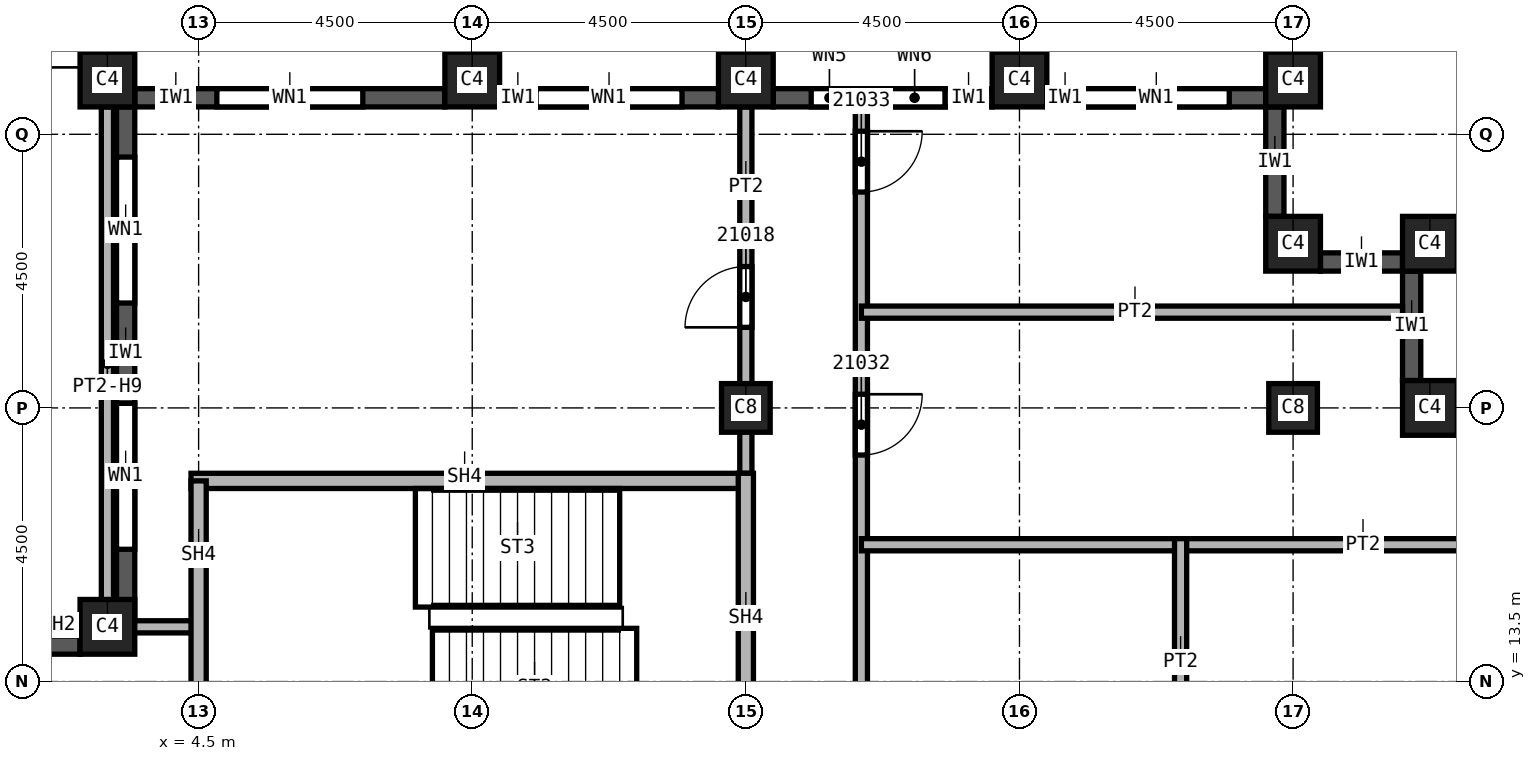
"""IFC4 building model, lengths in metres.
Left out: names, types, materials, properties, quantities, classifications, styles, units other than length and angle.
Written with IfcOpenShell. Run it as: python <this file> out.ifc"""

import sys

from ifc_helpers import new_model, si_unit, direction, frame, frame_2d, origin, origin_2d, place, context, subcontext, project, spatial, rectangle, extrude, element, fill, save


model = new_model("IFC4")
c1 = context("Model", 3, precision=1e-05, world=origin(), true_north=direction((0.0, 1.0)))
c2 = subcontext(c1, "Body", "Model", "MODEL_VIEW")
j1 = project(units=[si_unit("LENGTHUNIT", "METRE"), si_unit("PLANEANGLEUNIT", "RADIAN")], contexts=[c1])
p1 = place(None, origin())
s1 = spatial("IfcSite", under=j1, at=p1, CompositionType="ELEMENT")
p2 = place(p1, origin())
s2 = spatial("IfcBuilding", under=s1, at=p2, CompositionType="ELEMENT")
p3 = place(p2, frame((0.0, 0.0, 300.0)))
s3 = spatial("IfcBuildingStorey", under=s2, at=p3, CompositionType="ELEMENT", Elevation=300.0)
for number, where, z_axis, x_axis in (
    (1, (13.5, 18.0, 0.0), (0.0, 0.0, 1.0), (1.0, 0.0, 0.0)),
    (2, (22.5, 18.0, 0.0), (0.0, 0.0, 1.0), (1.0, 0.0, 0.0)),
):
    element("IfcColumn", number, at=place(p3, frame(where, z_axis=z_axis, x_axis=x_axis)), inside=s3, PredefinedType="COLUMN", context=c2, shape_type="SweptSolid", body=[
        extrude(rectangle(XDim=0.8, YDim=0.8, at=origin_2d()), origin(), (0.0, 0.0, 1.0), 3.74),
    ])
for number, where, z_axis, x_axis in (
    (3, (3.0, 23.4, 0.0), (0.0, 0.0, 1.0), (1.0, 0.0, 0.0)),
    (4, (9.0, 23.4, 0.0), (0.0, 0.0, 1.0), (1.0, 0.0, 0.0)),
    (5, (13.5, 23.4, 0.0), (0.0, 0.0, 1.0), (1.0, 0.0, 0.0)),
    (6, (18.0, 23.4, 0.0), (0.0, 0.0, 1.0), (1.0, 0.0, 0.0)),
    (7, (22.5, 23.4, 0.0), (0.0, 0.0, 1.0), (1.0, 0.0, 0.0)),
    (8, (3.0, 14.4, 0.0), (0.0, 0.0, 1.0), (1.0, 0.0, 0.0)),
    (9, (22.5, 20.7, 0.0), (0.0, 0.0, 1.0), (1.0, 0.0, 0.0)),
    (10, (24.75, 20.7, 0.0), (0.0, 0.0, 1.0), (1.0, 0.0, 0.0)),
    (11, (24.75, 18.0, 0.0), (0.0, 0.0, 1.0), (1.0, 0.0, 0.0)),
):
    element("IfcColumn", number, at=place(p3, frame(where, z_axis=z_axis, x_axis=x_axis)), inside=s3, PredefinedType="COLUMN", context=c2, shape_type="SweptSolid", body=[
        extrude(rectangle(XDim=0.9, YDim=0.9, at=origin_2d()), origin(), (0.0, 0.0, 1.0), 3.74),
    ])
p4 = place(p3, frame((24.45, 18.45, 0.0), z_axis=(0.0, 0.0, 1.0), x_axis=(0.0, 1.0, 0.0)))
e12 = element("IfcWall", 12, at=p4, inside=s3, PredefinedType="SOLIDWALL", context=c2, shape_type="SweptSolid", body=[
    extrude(rectangle(XDim=1.8, YDim=0.3, at=frame_2d((0.9, 0.0))), origin(), (0.0, 0.0, 1.0), 3.14),
])
p5 = place(p3, frame((24.3, 20.4, 0.0), z_axis=(0.0, 0.0, 1.0), x_axis=(-1.0, 0.0, 0.0)))
e13 = element("IfcWall", 13, at=p5, inside=s3, PredefinedType="SOLIDWALL", context=c2, shape_type="SweptSolid", body=[
    extrude(rectangle(XDim=1.35, YDim=0.3, at=frame_2d((0.675, 0.0))), origin(), (0.0, 0.0, 1.0), 3.14),
])
p6 = place(p3, frame((22.2, 21.15, 0.0), z_axis=(0.0, 0.0, 1.0), x_axis=(0.0, 1.0, 0.0)))
e14 = element("IfcWall", 14, at=p6, inside=s3, PredefinedType="SOLIDWALL", context=c2, shape_type="SweptSolid", body=[
    extrude(rectangle(XDim=1.8, YDim=0.3, at=frame_2d((0.9, 0.0))), origin(), (0.0, 0.0, 1.0), 3.14),
])
p7 = place(p3, frame((22.05, 23.1, 0.0), z_axis=(0.0, 0.0, 1.0), x_axis=(-1.0, 0.0, 0.0)))
e15 = element("IfcWall", 15, at=p7, inside=s3, PredefinedType="SOLIDWALL", context=c2, shape_type="SweptSolid", body=[
    extrude(rectangle(XDim=3.6, YDim=0.3, at=frame_2d((1.8, 0.0))), origin(), (0.0, 0.0, 1.0), 3.14),
])
p8 = place(p7, frame((0.6, 0.0, 0.8)))
e16 = element("IfcOpeningElement", 16, at=p8, cuts=e15, PredefinedType="OPENING", context=c2, shape_type="SweptSolid", body=[
    extrude(rectangle(XDim=2.4, YDim=1.95, at=frame_2d((1.2, 0.975))), frame((0.0, 0.15, 0.0), z_axis=(0.0, -1.0, 0.0), x_axis=(1.0, 0.0, 0.0)), (0.0, 0.0, 1.0), 0.3),
])
p9 = place(p3, frame((17.55, 23.1, 0.0), z_axis=(0.0, 0.0, 1.0), x_axis=(-1.0, 0.0, 0.0)))
e17 = element("IfcWall", 17, at=p9, inside=s3, PredefinedType="SOLIDWALL", context=c2, shape_type="SweptSolid", body=[
    extrude(rectangle(XDim=3.6, YDim=0.3, at=frame_2d((1.8, 0.0))), origin(), (0.0, 0.0, 1.0), 3.14),
])
p10 = place(p9, frame((0.775, 0.0, 0.8)))
e18 = element("IfcOpeningElement", 18, at=p10, cuts=e17, PredefinedType="OPENING", context=c2, shape_type="SweptSolid", body=[
    extrude(rectangle(XDim=1.0, YDim=1.95, at=frame_2d((0.5, 0.975))), frame((0.0, 0.15, 0.0), z_axis=(0.0, -1.0, 0.0), x_axis=(1.0, 0.0, 0.0)), (0.0, 0.0, 1.0), 0.3),
])
p11 = place(p9, frame((2.375, 0.0, 0.8)))
e19 = element("IfcOpeningElement", 19, at=p11, cuts=e17, PredefinedType="OPENING", context=c2, shape_type="SweptSolid", body=[
    extrude(rectangle(XDim=0.6, YDim=1.95, at=frame_2d((0.3, 0.975))), frame((0.0, 0.15, 0.0), z_axis=(0.0, -1.0, 0.0), x_axis=(1.0, 0.0, 0.0)), (0.0, 0.0, 1.0), 0.3),
])
p12 = place(p3, frame((13.05, 23.1, 0.0), z_axis=(0.0, 0.0, 1.0), x_axis=(-1.0, 0.0, 0.0)))
e20 = element("IfcWall", 20, at=p12, inside=s3, PredefinedType="SOLIDWALL", context=c2, shape_type="SweptSolid", body=[
    extrude(rectangle(XDim=3.6, YDim=0.3, at=frame_2d((1.8, 0.0))), origin(), (0.0, 0.0, 1.0), 3.14),
])
p13 = place(p12, frame((0.6, 0.0, 0.8)))
e21 = element("IfcOpeningElement", 21, at=p13, cuts=e20, PredefinedType="OPENING", context=c2, shape_type="SweptSolid", body=[
    extrude(rectangle(XDim=2.4, YDim=1.95, at=frame_2d((1.2, 0.975))), frame((0.0, 0.15, 0.0), z_axis=(0.0, -1.0, 0.0), x_axis=(1.0, 0.0, 0.0)), (0.0, 0.0, 1.0), 0.3),
])
p14 = place(p3, frame((8.55, 23.1, 0.0), z_axis=(0.0, 0.0, 1.0), x_axis=(-1.0, 0.0, 0.0)))
e22 = element("IfcWall", 22, at=p14, inside=s3, PredefinedType="SOLIDWALL", context=c2, shape_type="SweptSolid", body=[
    extrude(rectangle(XDim=5.1, YDim=0.3, at=frame_2d((2.55, 0.0))), origin(), (0.0, 0.0, 1.0), 3.14),
])
p15 = place(p14, frame((1.35, 0.0, 0.8)))
e23 = element("IfcOpeningElement", 23, at=p15, cuts=e22, PredefinedType="OPENING", context=c2, shape_type="SweptSolid", body=[
    extrude(rectangle(XDim=2.4, YDim=1.95, at=frame_2d((1.2, 0.975))), frame((0.0, 0.15, 0.0), z_axis=(0.0, -1.0, 0.0), x_axis=(1.0, 0.0, 0.0)), (0.0, 0.0, 1.0), 0.3),
])
p16 = place(p3, frame((3.3, 22.95, 0.0), z_axis=(0.0, 0.0, 1.0), x_axis=(0.0, -1.0, 0.0)))
e24 = element("IfcWall", 24, at=p16, inside=s3, PredefinedType="SOLIDWALL", context=c2, shape_type="SweptSolid", body=[
    extrude(rectangle(XDim=8.5, YDim=0.3, at=frame_2d((4.25, 0.0))), origin(), (0.0, 0.0, 1.0), 3.14),
])
p17 = place(p16, frame((0.825, 0.0, 0.8)))
e25 = element("IfcOpeningElement", 25, at=p17, cuts=e24, PredefinedType="OPENING", context=c2, shape_type="SweptSolid", body=[
    extrude(rectangle(XDim=2.4, YDim=1.95, at=frame_2d((1.2, 0.975))), frame((0.0, 0.15, 0.0), z_axis=(0.0, -1.0, 0.0), x_axis=(1.0, 0.0, 0.0)), (0.0, 0.0, 1.0), 0.3),
])
p18 = place(p16, frame((4.875, 0.0, 0.8)))
e26 = element("IfcOpeningElement", 26, at=p18, cuts=e24, PredefinedType="OPENING", context=c2, shape_type="SweptSolid", body=[
    extrude(rectangle(XDim=2.4, YDim=1.95, at=frame_2d((1.2, 0.975))), frame((0.0, 0.15, 0.0), z_axis=(0.0, -1.0, 0.0), x_axis=(1.0, 0.0, 0.0)), (0.0, 0.0, 1.0), 0.3),
])
p19 = place(p3, frame((-2.55, 14.1, 0.0), z_axis=(0.0, 0.0, 1.0), x_axis=(1.0, 0.0, 0.0)))
e27 = element("IfcWall", 27, at=p19, inside=s3, PredefinedType="SOLIDWALL", context=c2, shape_type="SweptSolid", body=[
    extrude(rectangle(XDim=5.1, YDim=0.3, at=frame_2d((2.55, 0.0))), origin(), (0.0, 0.0, 1.0), 3.14),
])
p20 = place(p19, frame((1.95, 0.0, 0.0)))
e28 = element("IfcOpeningElement", 28, at=p20, cuts=e27, PredefinedType="OPENING", context=c2, shape_type="SweptSolid", body=[
    extrude(rectangle(XDim=1.2, YDim=2.4, at=frame_2d((0.6, 1.2))), frame((0.0, 0.15, 0.0), z_axis=(0.0, -1.0, 0.0), x_axis=(1.0, 0.0, 0.0)), (0.0, 0.0, 1.0), 0.3),
])
p21 = place(p3, frame((0.9, 14.4, 0.0), z_axis=(0.0, 0.0, 1.0), x_axis=(1.0, 0.0, 0.0)))
e29 = element("IfcWall", 29, at=p21, inside=s3, PredefinedType="PARTITIONING", context=c2, shape_type="SweptSolid", body=[
    extrude(rectangle(XDim=3.6, YDim=0.2, at=frame_2d((1.8, 0.0))), origin(), (0.0, 0.0, 1.0), 3.207),
])
p22 = place(p3, frame((3.0, 22.95, 0.0), z_axis=(0.0, 0.0, 1.0), x_axis=(0.0, -1.0, 0.0)))
e30 = element("IfcWall", 30, at=p22, inside=s3, PredefinedType="PARTITIONING", context=c2, shape_type="SweptSolid", body=[
    extrude(rectangle(XDim=8.55, YDim=0.2, at=frame_2d((4.275, 0.0))), origin(), (0.0, 0.0, 1.0), 2.894),
])
p23 = place(p3, frame((13.5, 16.675, 0.0), z_axis=(0.0, 0.0, 1.0), x_axis=(0.0, 1.0, 0.0)))
e31 = element("IfcWall", 31, at=p23, inside=s3, PredefinedType="PARTITIONING", context=c2, shape_type="SweptSolid", body=[
    extrude(rectangle(XDim=6.275, YDim=0.2, at=frame_2d((3.137, 0.0))), origin(), (0.0, 0.0, 1.0), 3.74),
])
p24 = place(p23, frame((2.65, 0.0, 0.0)))
e32 = element("IfcOpeningElement", 32, at=p24, cuts=e31, PredefinedType="OPENING", context=c2, shape_type="SweptSolid", body=[
    extrude(rectangle(XDim=1.0, YDim=2.1, at=frame_2d((0.5, 1.05))), frame((0.0, 0.1, 0.0), z_axis=(0.0, -1.0, 0.0), x_axis=(1.0, 0.0, 0.0)), (0.0, 0.0, 1.0), 0.2),
])
p25 = place(p3, frame((15.4, 22.95, 0.0), z_axis=(0.0, 0.0, 1.0), x_axis=(0.0, -1.0, 0.0)))
e33 = element("IfcWall", 33, at=p25, inside=s3, PredefinedType="PARTITIONING", context=c2, shape_type="SweptSolid", body=[
    extrude(rectangle(XDim=45.9, YDim=0.2, at=frame_2d((22.95, 0.0))), origin(), (0.0, 0.0, 1.0), 3.74),
])
p26 = place(p25, frame((20.7, 0.0, 0.0)))
e34 = element("IfcOpeningElement", 34, at=p26, cuts=e33, PredefinedType="OPENING", context=c2, shape_type="SweptSolid", body=[
    extrude(rectangle(XDim=1.0, YDim=2.1, at=frame_2d((0.5, 1.05))), frame((0.0, 0.1, 0.0), z_axis=(0.0, -1.0, 0.0), x_axis=(1.0, 0.0, 0.0)), (0.0, 0.0, 1.0), 0.2),
])
p27 = place(p25, frame((11.85, 0.0, 0.0)))
e35 = element("IfcOpeningElement", 35, at=p27, cuts=e33, PredefinedType="OPENING", context=c2, shape_type="SweptSolid", body=[
    extrude(rectangle(XDim=1.0, YDim=2.1, at=frame_2d((0.5, 1.05))), frame((0.0, 0.1, 0.0), z_axis=(0.0, -1.0, 0.0), x_axis=(1.0, 0.0, 0.0)), (0.0, 0.0, 1.0), 0.2),
])
p28 = place(p25, frame((4.725, 0.0, 0.0)))
e36 = element("IfcOpeningElement", 36, at=p28, cuts=e33, PredefinedType="OPENING", context=c2, shape_type="SweptSolid", body=[
    extrude(rectangle(XDim=1.0, YDim=2.1, at=frame_2d((0.5, 1.05))), frame((0.0, 0.1, 0.0), z_axis=(0.0, -1.0, 0.0), x_axis=(1.0, 0.0, 0.0)), (0.0, 0.0, 1.0), 0.2),
])
p29 = place(p25, frame((0.4, 0.0, 0.0)))
e37 = element("IfcOpeningElement", 37, at=p29, cuts=e33, PredefinedType="OPENING", context=c2, shape_type="SweptSolid", body=[
    extrude(rectangle(XDim=1.0, YDim=2.1, at=frame_2d((0.5, 1.05))), frame((0.0, 0.1, 0.0), z_axis=(0.0, -1.0, 0.0), x_axis=(1.0, 0.0, 0.0)), (0.0, 0.0, 1.0), 0.2),
])
p30 = place(p25, frame((38.85, 0.0, 0.0)))
e38 = element("IfcOpeningElement", 38, at=p30, cuts=e33, PredefinedType="OPENING", context=c2, shape_type="SweptSolid", body=[
    extrude(rectangle(XDim=1.0, YDim=2.1, at=frame_2d((0.5, 1.05))), frame((0.0, 0.1, 0.0), z_axis=(0.0, -1.0, 0.0), x_axis=(1.0, 0.0, 0.0)), (0.0, 0.0, 1.0), 0.2),
])
p31 = place(p25, frame((26.55, 0.0, 0.0)))
e39 = element("IfcOpeningElement", 39, at=p31, cuts=e33, PredefinedType="OPENING", context=c2, shape_type="SweptSolid", body=[
    extrude(rectangle(XDim=1.0, YDim=2.1, at=frame_2d((0.5, 1.05))), frame((0.0, 0.1, 0.0), z_axis=(0.0, -1.0, 0.0), x_axis=(1.0, 0.0, 0.0)), (0.0, 0.0, 1.0), 0.2),
])
p32 = place(p3, frame((15.4, 15.75, 0.0), z_axis=(0.0, 0.0, 1.0), x_axis=(1.0, 0.0, 0.0)))
e40 = element("IfcWall", 40, at=p32, inside=s3, PredefinedType="PARTITIONING", context=c2, shape_type="SweptSolid", body=[
    extrude(rectangle(XDim=11.15, YDim=0.2, at=frame_2d((5.575, 0.0))), origin(), (0.0, 0.0, 1.0), 3.74),
])
p33 = place(p3, frame((15.4, 19.575, 0.0), z_axis=(0.0, 0.0, 1.0), x_axis=(1.0, 0.0, 0.0)))
e41 = element("IfcWall", 41, at=p33, inside=s3, PredefinedType="PARTITIONING", context=c2, shape_type="SweptSolid", body=[
    extrude(rectangle(XDim=8.9, YDim=0.2, at=frame_2d((4.45, 0.0))), origin(), (0.0, 0.0, 1.0), 3.74),
])
p34 = place(p3, frame((20.65, 15.85, 0.0), z_axis=(0.0, 0.0, 1.0), x_axis=(0.0, -1.0, 0.0)))
e42 = element("IfcWall", 42, at=p34, inside=s3, PredefinedType="PARTITIONING", context=c2, shape_type="SweptSolid", body=[
    extrude(rectangle(XDim=6.85, YDim=0.2, at=frame_2d((3.425, 0.0))), origin(), (0.0, 0.0, 1.0), 3.74),
])
p35 = place(p34, frame((3.85, 0.0, 0.0)))
e43 = element("IfcOpeningElement", 43, at=p35, cuts=e42, PredefinedType="OPENING", context=c2, shape_type="SweptSolid", body=[
    extrude(rectangle(XDim=1.0, YDim=2.1, at=frame_2d((0.5, 1.05))), frame((0.0, 0.1, 0.0), z_axis=(0.0, -1.0, 0.0), x_axis=(1.0, 0.0, 0.0)), (0.0, 0.0, 1.0), 0.2),
])
p36 = place(p3, frame((4.375, 16.8, 0.0), z_axis=(0.0, 0.0, 1.0), x_axis=(1.0, 0.0, 0.0)))
e44 = element("IfcWall", 44, at=p36, inside=s3, PredefinedType="SOLIDWALL", context=c2, shape_type="SweptSolid", body=[
    extrude(rectangle(XDim=9.125, YDim=0.25, at=frame_2d((4.562, 0.0))), origin(), (0.0, 0.0, 1.0), 3.74),
])
p37 = place(p3, frame((4.5, 12.3, 0.0), z_axis=(0.0, 0.0, 1.0), x_axis=(0.0, 1.0, 0.0)))
e45 = element("IfcWall", 45, at=p37, inside=s3, PredefinedType="SOLIDWALL", context=c2, shape_type="SweptSolid", body=[
    extrude(rectangle(XDim=4.5, YDim=0.25, at=frame_2d((2.25, 0.0))), origin(), (0.0, 0.0, 1.0), 3.74),
])
p38 = place(p3, frame((13.5, 12.175, 0.0), z_axis=(0.0, 0.0, 1.0), x_axis=(0.0, 1.0, 0.0)))
e46 = element("IfcWall", 46, at=p38, inside=s3, PredefinedType="SOLIDWALL", context=c2, shape_type="SweptSolid", body=[
    extrude(rectangle(XDim=4.75, YDim=0.25, at=frame_2d((2.375, 0.0))), origin(), (0.0, 0.0, 1.0), 3.74),
])
p39 = place(p8, origin())
e47 = element("IfcWindow", 47, at=p39, inside=s3, PartitioningType="SINGLE_PANEL", PredefinedType="WINDOW", context=c2, shape_type="SweptSolid", body=[
    extrude(rectangle(XDim=2.4, YDim=1.95, at=frame_2d((1.2, 0.975))), frame((0.0, 0.03, 0.0), z_axis=(0.0, -1.0, 0.0), x_axis=(1.0, 0.0, 0.0)), (0.0, 0.0, 1.0), 0.06),
])
fill(e16, e47)
p40 = place(p13, origin())
e48 = element("IfcWindow", 48, at=p40, inside=s3, PartitioningType="SINGLE_PANEL", PredefinedType="WINDOW", context=c2, shape_type="SweptSolid", body=[
    extrude(rectangle(XDim=2.4, YDim=1.95, at=frame_2d((1.2, 0.975))), frame((0.0, 0.03, 0.0), z_axis=(0.0, -1.0, 0.0), x_axis=(1.0, 0.0, 0.0)), (0.0, 0.0, 1.0), 0.06),
])
fill(e21, e48)
p41 = place(p15, origin())
e49 = element("IfcWindow", 49, at=p41, inside=s3, PartitioningType="SINGLE_PANEL", PredefinedType="WINDOW", context=c2, shape_type="SweptSolid", body=[
    extrude(rectangle(XDim=2.4, YDim=1.95, at=frame_2d((1.2, 0.975))), frame((0.0, 0.03, 0.0), z_axis=(0.0, -1.0, 0.0), x_axis=(1.0, 0.0, 0.0)), (0.0, 0.0, 1.0), 0.06),
])
fill(e23, e49)
p42 = place(p17, origin())
e50 = element("IfcWindow", 50, at=p42, inside=s3, PartitioningType="SINGLE_PANEL", PredefinedType="WINDOW", context=c2, shape_type="SweptSolid", body=[
    extrude(rectangle(XDim=2.4, YDim=1.95, at=frame_2d((1.2, 0.975))), frame((0.0, 0.03, 0.0), z_axis=(0.0, -1.0, 0.0), x_axis=(1.0, 0.0, 0.0)), (0.0, 0.0, 1.0), 0.06),
])
fill(e25, e50)
p43 = place(p18, origin())
e51 = element("IfcWindow", 51, at=p43, inside=s3, PartitioningType="SINGLE_PANEL", PredefinedType="WINDOW", context=c2, shape_type="SweptSolid", body=[
    extrude(rectangle(XDim=2.4, YDim=1.95, at=frame_2d((1.2, 0.975))), frame((0.0, 0.03, 0.0), z_axis=(0.0, -1.0, 0.0), x_axis=(1.0, 0.0, 0.0)), (0.0, 0.0, 1.0), 0.06),
])
fill(e26, e51)
p44 = place(p24, origin())
e52 = element("IfcDoor", 52, at=p44, inside=s3, OperationType="SINGLE_SWING_LEFT", PredefinedType="DOOR", context=c2, shape_type="SweptSolid", body=[
    extrude(rectangle(XDim=1.0, YDim=2.1, at=frame_2d((0.5, 1.05))), frame((0.0, 0.025, 0.0), z_axis=(0.0, -1.0, 0.0), x_axis=(1.0, 0.0, 0.0)), (0.0, 0.0, 1.0), 0.05),
])
fill(e32, e52)
p45 = place(p28, origin())
e53 = element("IfcDoor", 53, at=p45, inside=s3, OperationType="SINGLE_SWING_LEFT", PredefinedType="DOOR", context=c2, shape_type="SweptSolid", body=[
    extrude(rectangle(XDim=1.0, YDim=2.1, at=frame_2d((0.5, 1.05))), frame((0.0, 0.025, 0.0), z_axis=(0.0, -1.0, 0.0), x_axis=(1.0, 0.0, 0.0)), (0.0, 0.0, 1.0), 0.05),
])
fill(e36, e53)
p46 = place(p29, origin())
e54 = element("IfcDoor", 54, at=p46, inside=s3, OperationType="SINGLE_SWING_RIGHT", PredefinedType="DOOR", context=c2, shape_type="SweptSolid", body=[
    extrude(rectangle(XDim=1.0, YDim=2.1, at=frame_2d((0.5, 1.05))), frame((0.0, 0.025, 0.0), z_axis=(0.0, -1.0, 0.0), x_axis=(1.0, 0.0, 0.0)), (0.0, 0.0, 1.0), 0.05),
])
fill(e37, e54)
p47 = place(p10, origin())
e55 = element("IfcWindow", 55, at=p47, inside=s3, PartitioningType="SINGLE_PANEL", PredefinedType="WINDOW", context=c2, shape_type="SweptSolid", body=[
    extrude(rectangle(XDim=1.0, YDim=1.95, at=frame_2d((0.5, 0.975))), frame((0.0, 0.03, 0.0), z_axis=(0.0, -1.0, 0.0), x_axis=(1.0, 0.0, 0.0)), (0.0, 0.0, 1.0), 0.06),
])
fill(e18, e55)
p48 = place(p11, origin())
e56 = element("IfcWindow", 56, at=p48, inside=s3, PartitioningType="SINGLE_PANEL", PredefinedType="WINDOW", context=c2, shape_type="SweptSolid", body=[
    extrude(rectangle(XDim=0.6, YDim=1.95, at=frame_2d((0.3, 0.975))), frame((0.0, 0.03, 0.0), z_axis=(0.0, -1.0, 0.0), x_axis=(1.0, 0.0, 0.0)), (0.0, 0.0, 1.0), 0.06),
])
fill(e19, e56)
save(model, sys.argv[1])
